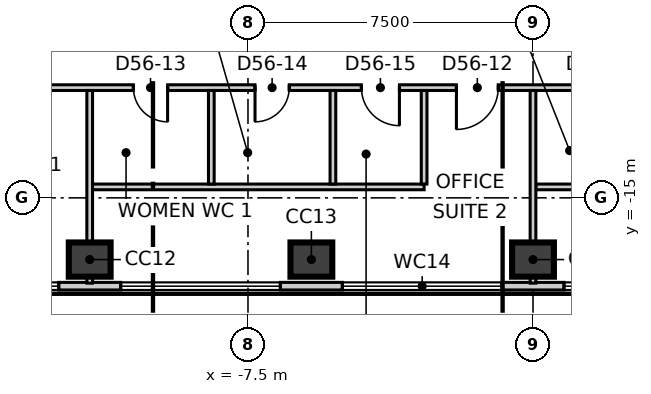
"""IFC4 building model, lengths in metres.
Left out: names, types, materials, properties, quantities, classifications, styles, units other than length and angle.
Written with IfcOpenShell. Run it as: python <this file> out.ifc"""

import sys

from ifc_helpers import new_model, si_unit, direction, frame, frame_2d, origin, origin_2d, place, context, subcontext, project, spatial, rectangle, extrude, element, fill, save


model = new_model("IFC4")
c1 = context("Model", 3, precision=1e-05, world=origin(), true_north=direction((0.0, 1.0)))
c2 = subcontext(c1, "Body", "Model", "MODEL_VIEW")
j1 = project(units=[si_unit("LENGTHUNIT", "METRE"), si_unit("PLANEANGLEUNIT", "RADIAN")], contexts=[c1])
p1 = place(None, origin())
s1 = spatial("IfcSite", under=j1, at=p1, CompositionType="ELEMENT")
p2 = place(p1, origin())
s2 = spatial("IfcBuilding", under=s1, at=p2, CompositionType="ELEMENT")
p3 = place(p2, frame((0.0, 0.0, 239.3)))
s3 = spatial("IfcBuildingStorey", under=s2, at=p3, CompositionType="ELEMENT", Elevation=239.3)
for number, where, z_axis, x_axis in (
    (1, (-11.665, -16.624, -0.3), (0.0, 0.0, 1.0), (1.0, 0.0, 0.0)),
    (2, (-5.832, -16.624, -0.3), (0.0, 0.0, 1.0), (1.0, 0.0, 0.0)),
    (3, (0.0, -16.624, -0.3), (0.0, 0.0, 1.0), (1.0, 0.0, 0.0)),
):
    element("IfcColumn", number, at=place(p3, frame(where, z_axis=z_axis, x_axis=x_axis)), inside=s3, PredefinedType="COLUMN", context=c2, shape_type="SweptSolid", body=[
        extrude(rectangle(XDim=1.1, YDim=0.9, at=origin_2d()), origin(), (0.0, 0.0, 1.0), 4.0),
    ])
p4 = place(p3, frame((-2.687, 29.995, 0.0), z_axis=(0.0, 0.0, 1.0), x_axis=(-0.499992950893, -0.86602947355, 0.0)))
e4 = element("IfcWall", 4, at=p4, inside=s3, PredefinedType="ELEMENTEDWALL", context=c2, shape_type="SweptSolid", body=[
    extrude(rectangle(XDim=49.247, YDim=0.2, at=frame_2d((24.624, 0.0))), origin(), (0.0, 0.0, 1.0), 3.7),
])
p5 = place(p4, frame((2.119, 0.0, 0.9)))
e5 = element("IfcOpeningElement", 5, at=p5, cuts=e4, PredefinedType="OPENING", context=c2, shape_type="SweptSolid", body=[
    extrude(rectangle(XDim=4.2, YDim=2.5, at=frame_2d((2.1, 1.25))), frame((0.0, 0.11, 0.0), z_axis=(0.0, -1.0, 0.0), x_axis=(1.0, 0.0, 0.0)), (0.0, 0.0, 1.0), 0.22),
])
p6 = place(p4, frame((7.951, 0.0, 0.9)))
e6 = element("IfcOpeningElement", 6, at=p6, cuts=e4, PredefinedType="OPENING", context=c2, shape_type="SweptSolid", body=[
    extrude(rectangle(XDim=4.2, YDim=2.5, at=frame_2d((2.1, 1.25))), frame((0.0, 0.11, 0.0), z_axis=(0.0, -1.0, 0.0), x_axis=(1.0, 0.0, 0.0)), (0.0, 0.0, 1.0), 0.22),
])
p7 = place(p4, frame((13.784, 0.0, 0.9)))
e7 = element("IfcOpeningElement", 7, at=p7, cuts=e4, PredefinedType="OPENING", context=c2, shape_type="SweptSolid", body=[
    extrude(rectangle(XDim=4.2, YDim=2.5, at=frame_2d((2.1, 1.25))), frame((0.0, 0.11, 0.0), z_axis=(0.0, -1.0, 0.0), x_axis=(1.0, 0.0, 0.0)), (0.0, 0.0, 1.0), 0.22),
])
p8 = place(p4, frame((19.617, 0.0, 0.9)))
e8 = element("IfcOpeningElement", 8, at=p8, cuts=e4, PredefinedType="OPENING", context=c2, shape_type="SweptSolid", body=[
    extrude(rectangle(XDim=4.2, YDim=2.5, at=frame_2d((2.1, 1.25))), frame((0.0, 0.11, 0.0), z_axis=(0.0, -1.0, 0.0), x_axis=(1.0, 0.0, 0.0)), (0.0, 0.0, 1.0), 0.22),
])
p9 = place(p4, frame((25.449, 0.0, 0.9)))
e9 = element("IfcOpeningElement", 9, at=p9, cuts=e4, PredefinedType="OPENING", context=c2, shape_type="SweptSolid", body=[
    extrude(rectangle(XDim=4.2, YDim=2.5, at=frame_2d((2.1, 1.25))), frame((0.0, 0.11, 0.0), z_axis=(0.0, -1.0, 0.0), x_axis=(1.0, 0.0, 0.0)), (0.0, 0.0, 1.0), 0.22),
])
p10 = place(p4, frame((31.282, 0.0, 0.9)))
e10 = element("IfcOpeningElement", 10, at=p10, cuts=e4, PredefinedType="OPENING", context=c2, shape_type="SweptSolid", body=[
    extrude(rectangle(XDim=4.2, YDim=2.5, at=frame_2d((2.1, 1.25))), frame((0.0, 0.11, 0.0), z_axis=(0.0, -1.0, 0.0), x_axis=(1.0, 0.0, 0.0)), (0.0, 0.0, 1.0), 0.22),
])
p11 = place(p4, frame((37.115, 0.0, 0.9)))
e11 = element("IfcOpeningElement", 11, at=p11, cuts=e4, PredefinedType="OPENING", context=c2, shape_type="SweptSolid", body=[
    extrude(rectangle(XDim=4.2, YDim=2.5, at=frame_2d((2.1, 1.25))), frame((0.0, 0.11, 0.0), z_axis=(0.0, -1.0, 0.0), x_axis=(1.0, 0.0, 0.0)), (0.0, 0.0, 1.0), 0.22),
])
p12 = place(p4, frame((42.947, 0.0, 0.9)))
e12 = element("IfcOpeningElement", 12, at=p12, cuts=e4, PredefinedType="OPENING", context=c2, shape_type="SweptSolid", body=[
    extrude(rectangle(XDim=4.2, YDim=2.5, at=frame_2d((2.1, 1.25))), frame((0.0, 0.11, 0.0), z_axis=(0.0, -1.0, 0.0), x_axis=(1.0, 0.0, 0.0)), (0.0, 0.0, 1.0), 0.22),
])
p13 = place(p3, frame((-24.633, -17.324, 0.0), z_axis=(0.0, 0.0, 1.0), x_axis=(1.0, 0.0, 0.0)))
e13 = element("IfcWall", 13, at=p13, inside=s3, PredefinedType="ELEMENTEDWALL", context=c2, shape_type="SweptSolid", body=[
    extrude(rectangle(XDim=49.246, YDim=0.2, at=frame_2d((24.623, 0.0))), origin(), (0.0, 0.0, 1.0), 3.7),
])
p14 = place(p13, frame((2.119, 0.0, 0.9)))
e14 = element("IfcOpeningElement", 14, at=p14, cuts=e13, PredefinedType="OPENING", context=c2, shape_type="SweptSolid", body=[
    extrude(rectangle(XDim=4.2, YDim=2.5, at=frame_2d((2.1, 1.25))), frame((0.0, 0.11, 0.0), z_axis=(0.0, -1.0, 0.0), x_axis=(1.0, 0.0, 0.0)), (0.0, 0.0, 1.0), 0.22),
])
p15 = place(p13, frame((7.952, 0.0, 0.9)))
e15 = element("IfcOpeningElement", 15, at=p15, cuts=e13, PredefinedType="OPENING", context=c2, shape_type="SweptSolid", body=[
    extrude(rectangle(XDim=4.2, YDim=2.5, at=frame_2d((2.1, 1.25))), frame((0.0, 0.11, 0.0), z_axis=(0.0, -1.0, 0.0), x_axis=(1.0, 0.0, 0.0)), (0.0, 0.0, 1.0), 0.22),
])
p16 = place(p13, frame((13.784, 0.0, 0.9)))
e16 = element("IfcOpeningElement", 16, at=p16, cuts=e13, PredefinedType="OPENING", context=c2, shape_type="SweptSolid", body=[
    extrude(rectangle(XDim=4.2, YDim=2.5, at=frame_2d((2.1, 1.25))), frame((0.0, 0.11, 0.0), z_axis=(0.0, -1.0, 0.0), x_axis=(1.0, 0.0, 0.0)), (0.0, 0.0, 1.0), 0.22),
])
p17 = place(p13, frame((19.617, 0.0, 0.9)))
e17 = element("IfcOpeningElement", 17, at=p17, cuts=e13, PredefinedType="OPENING", context=c2, shape_type="SweptSolid", body=[
    extrude(rectangle(XDim=4.2, YDim=2.5, at=frame_2d((2.1, 1.25))), frame((0.0, 0.11, 0.0), z_axis=(0.0, -1.0, 0.0), x_axis=(1.0, 0.0, 0.0)), (0.0, 0.0, 1.0), 0.22),
])
p18 = place(p13, frame((25.449, 0.0, 0.9)))
e18 = element("IfcOpeningElement", 18, at=p18, cuts=e13, PredefinedType="OPENING", context=c2, shape_type="SweptSolid", body=[
    extrude(rectangle(XDim=4.2, YDim=2.5, at=frame_2d((2.1, 1.25))), frame((0.0, 0.11, 0.0), z_axis=(0.0, -1.0, 0.0), x_axis=(1.0, 0.0, 0.0)), (0.0, 0.0, 1.0), 0.22),
])
p19 = place(p13, frame((31.282, 0.0, 0.9)))
e19 = element("IfcOpeningElement", 19, at=p19, cuts=e13, PredefinedType="OPENING", context=c2, shape_type="SweptSolid", body=[
    extrude(rectangle(XDim=4.2, YDim=2.5, at=frame_2d((2.1, 1.25))), frame((0.0, 0.11, 0.0), z_axis=(0.0, -1.0, 0.0), x_axis=(1.0, 0.0, 0.0)), (0.0, 0.0, 1.0), 0.22),
])
p20 = place(p13, frame((37.114, 0.0, 0.9)))
e20 = element("IfcOpeningElement", 20, at=p20, cuts=e13, PredefinedType="OPENING", context=c2, shape_type="SweptSolid", body=[
    extrude(rectangle(XDim=4.2, YDim=2.5, at=frame_2d((2.1, 1.25))), frame((0.0, 0.11, 0.0), z_axis=(0.0, -1.0, 0.0), x_axis=(1.0, 0.0, 0.0)), (0.0, 0.0, 1.0), 0.22),
])
p21 = place(p13, frame((42.947, 0.0, 0.9)))
e21 = element("IfcOpeningElement", 21, at=p21, cuts=e13, PredefinedType="OPENING", context=c2, shape_type="SweptSolid", body=[
    extrude(rectangle(XDim=4.2, YDim=2.5, at=frame_2d((2.1, 1.25))), frame((0.0, 0.11, 0.0), z_axis=(0.0, -1.0, 0.0), x_axis=(1.0, 0.0, 0.0)), (0.0, 0.0, 1.0), 0.22),
])
p22 = place(p3, frame((-20.807, -12.1, 0.0), z_axis=(0.0, 0.0, 1.0), x_axis=(1.0, 0.0, 0.0)))
e22 = element("IfcWall", 22, at=p22, inside=s3, PredefinedType="PARTITIONING", context=c2, shape_type="SweptSolid", body=[
    extrude(rectangle(XDim=41.764, YDim=0.15, at=frame_2d((20.882, 0.0))), origin(), (0.0, 0.0, 1.0), 3.7),
])
p23 = place(p22, frame((3.9, 0.0, 0.0)))
e23 = element("IfcOpeningElement", 23, at=p23, cuts=e22, PredefinedType="OPENING", context=c2, shape_type="SweptSolid", body=[
    extrude(rectangle(XDim=1.1, YDim=2.1, at=frame_2d((0.55, 1.05))), frame((0.0, 0.085, 0.0), z_axis=(0.0, -1.0, 0.0), x_axis=(1.0, 0.0, 0.0)), (0.0, 0.0, 1.0), 0.17),
])
p24 = place(p22, frame((18.792, 0.0, 0.0)))
e24 = element("IfcOpeningElement", 24, at=p24, cuts=e22, PredefinedType="OPENING", context=c2, shape_type="SweptSolid", body=[
    extrude(rectangle(XDim=1.1, YDim=2.1, at=frame_2d((0.55, 1.05))), frame((0.0, 0.085, 0.0), z_axis=(0.0, -1.0, 0.0), x_axis=(1.0, 0.0, 0.0)), (0.0, 0.0, 1.0), 0.17),
])
p25 = place(p22, frame((10.292, 0.0, 0.0)))
e25 = element("IfcOpeningElement", 25, at=p25, cuts=e22, PredefinedType="OPENING", context=c2, shape_type="SweptSolid", body=[
    extrude(rectangle(XDim=0.9, YDim=2.1, at=frame_2d((0.45, 1.05))), frame((0.0, 0.085, 0.0), z_axis=(0.0, -1.0, 0.0), x_axis=(1.0, 0.0, 0.0)), (0.0, 0.0, 1.0), 0.17),
])
p26 = place(p22, frame((13.492, 0.0, 0.0)))
e26 = element("IfcOpeningElement", 26, at=p26, cuts=e22, PredefinedType="OPENING", context=c2, shape_type="SweptSolid", body=[
    extrude(rectangle(XDim=0.9, YDim=2.1, at=frame_2d((0.45, 1.05))), frame((0.0, 0.085, 0.0), z_axis=(0.0, -1.0, 0.0), x_axis=(1.0, 0.0, 0.0)), (0.0, 0.0, 1.0), 0.17),
])
p27 = place(p22, frame((16.292, 0.0, 0.0)))
e27 = element("IfcOpeningElement", 27, at=p27, cuts=e22, PredefinedType="OPENING", context=c2, shape_type="SweptSolid", body=[
    extrude(rectangle(XDim=1.0, YDim=2.1, at=frame_2d((0.5, 1.05))), frame((0.0, 0.085, 0.0), z_axis=(0.0, -1.0, 0.0), x_axis=(1.0, 0.0, 0.0)), (0.0, 0.0, 1.0), 0.17),
])
p28 = place(p22, frame((29.057, 0.0, 0.0)))
e28 = element("IfcOpeningElement", 28, at=p28, cuts=e22, PredefinedType="OPENING", context=c2, shape_type="SweptSolid", body=[
    extrude(rectangle(XDim=1.1, YDim=2.1, at=frame_2d((0.55, 1.05))), frame((0.0, 0.085, 0.0), z_axis=(0.0, -1.0, 0.0), x_axis=(1.0, 0.0, 0.0)), (0.0, 0.0, 1.0), 0.17),
])
p29 = place(p22, frame((22.157, 0.0, 0.0)))
e29 = element("IfcOpeningElement", 29, at=p29, cuts=e22, PredefinedType="OPENING", context=c2, shape_type="SweptSolid", body=[
    extrude(rectangle(XDim=0.9, YDim=2.1, at=frame_2d((0.45, 1.05))), frame((0.0, 0.085, 0.0), z_axis=(0.0, -1.0, 0.0), x_axis=(1.0, 0.0, 0.0)), (0.0, 0.0, 1.0), 0.17),
])
p30 = place(p22, frame((25.157, 0.0, 0.0)))
e30 = element("IfcOpeningElement", 30, at=p30, cuts=e22, PredefinedType="OPENING", context=c2, shape_type="SweptSolid", body=[
    extrude(rectangle(XDim=0.9, YDim=2.1, at=frame_2d((0.45, 1.05))), frame((0.0, 0.085, 0.0), z_axis=(0.0, -1.0, 0.0), x_axis=(1.0, 0.0, 0.0)), (0.0, 0.0, 1.0), 0.17),
])
p31 = place(p22, frame((36.522, 0.0, 0.0)))
e31 = element("IfcOpeningElement", 31, at=p31, cuts=e22, PredefinedType="OPENING", context=c2, shape_type="SweptSolid", body=[
    extrude(rectangle(XDim=1.1, YDim=2.1, at=frame_2d((0.55, 1.05))), frame((0.0, 0.085, 0.0), z_axis=(0.0, -1.0, 0.0), x_axis=(1.0, 0.0, 0.0)), (0.0, 0.0, 1.0), 0.17),
])
p32 = place(p3, frame((-20.883, -11.97, 0.0), z_axis=(0.0, 0.0, 1.0), x_axis=(0.500006150555, 0.866021852731, 0.0)))
e32 = element("IfcWall", 32, at=p32, inside=s3, PredefinedType="PARTITIONING", context=c2, shape_type="SweptSolid", body=[
    extrude(rectangle(XDim=41.766, YDim=0.15, at=frame_2d((20.883, 0.0))), origin(), (0.0, 0.0, 1.0), 3.7),
])
p33 = place(p32, frame((36.616, 0.0, 0.0)))
e33 = element("IfcOpeningElement", 33, at=p33, cuts=e32, PredefinedType="OPENING", context=c2, shape_type="SweptSolid", body=[
    extrude(rectangle(XDim=1.1, YDim=2.1, at=frame_2d((0.55, 1.05))), frame((0.0, 0.085, 0.0), z_axis=(0.0, -1.0, 0.0), x_axis=(1.0, 0.0, 0.0)), (0.0, 0.0, 1.0), 0.17),
])
p34 = place(p32, frame((21.723, 0.0, 0.0)))
e34 = element("IfcOpeningElement", 34, at=p34, cuts=e32, PredefinedType="OPENING", context=c2, shape_type="SweptSolid", body=[
    extrude(rectangle(XDim=1.1, YDim=2.1, at=frame_2d((0.55, 1.05))), frame((0.0, 0.085, 0.0), z_axis=(0.0, -1.0, 0.0), x_axis=(1.0, 0.0, 0.0)), (0.0, 0.0, 1.0), 0.17),
])
p35 = place(p32, frame((30.423, 0.0, 0.0)))
e35 = element("IfcOpeningElement", 35, at=p35, cuts=e32, PredefinedType="OPENING", context=c2, shape_type="SweptSolid", body=[
    extrude(rectangle(XDim=0.9, YDim=2.1, at=frame_2d((0.45, 1.05))), frame((0.0, 0.085, 0.0), z_axis=(0.0, -1.0, 0.0), x_axis=(1.0, 0.0, 0.0)), (0.0, 0.0, 1.0), 0.17),
])
p36 = place(p32, frame((27.223, 0.0, 0.0)))
e36 = element("IfcOpeningElement", 36, at=p36, cuts=e32, PredefinedType="OPENING", context=c2, shape_type="SweptSolid", body=[
    extrude(rectangle(XDim=0.9, YDim=2.1, at=frame_2d((0.45, 1.05))), frame((0.0, 0.085, 0.0), z_axis=(0.0, -1.0, 0.0), x_axis=(1.0, 0.0, 0.0)), (0.0, 0.0, 1.0), 0.17),
])
p37 = place(p32, frame((24.323, 0.0, 0.0)))
e37 = element("IfcOpeningElement", 37, at=p37, cuts=e32, PredefinedType="OPENING", context=c2, shape_type="SweptSolid", body=[
    extrude(rectangle(XDim=1.0, YDim=2.1, at=frame_2d((0.5, 1.05))), frame((0.0, 0.085, 0.0), z_axis=(0.0, -1.0, 0.0), x_axis=(1.0, 0.0, 0.0)), (0.0, 0.0, 1.0), 0.17),
])
p38 = place(p32, frame((17.358, 0.0, 0.0)))
e38 = element("IfcOpeningElement", 38, at=p38, cuts=e32, PredefinedType="OPENING", context=c2, shape_type="SweptSolid", body=[
    extrude(rectangle(XDim=1.0, YDim=2.1, at=frame_2d((0.5, 1.05))), frame((0.0, 0.085, 0.0), z_axis=(0.0, -1.0, 0.0), x_axis=(1.0, 0.0, 0.0)), (0.0, 0.0, 1.0), 0.17),
])
p39 = place(p32, frame((6.825, 0.0, 0.0)))
e39 = element("IfcOpeningElement", 39, at=p39, cuts=e32, PredefinedType="OPENING", context=c2, shape_type="SweptSolid", body=[
    extrude(rectangle(XDim=1.1, YDim=2.1, at=frame_2d((0.55, 1.05))), frame((0.0, 0.085, 0.0), z_axis=(0.0, -1.0, 0.0), x_axis=(1.0, 0.0, 0.0)), (0.0, 0.0, 1.0), 0.17),
])
p40 = place(p3, frame((-11.665, -17.244, 0.0), z_axis=(0.0, 0.0, 1.0), x_axis=(0.0, 1.0, 0.0)))
e40 = element("IfcWall", 40, at=p40, inside=s3, PredefinedType="PARTITIONING", context=c2, shape_type="SweptSolid", body=[
    extrude(rectangle(XDim=5.069, YDim=0.15, at=frame_2d((2.534, 0.0))), origin(), (0.0, 0.0, 1.0), 3.7),
])
p41 = place(p3, frame((-11.59, -14.712, 0.0), z_axis=(0.0, 0.0, 1.0), x_axis=(1.0, 0.0, 0.0)))
e41 = element("IfcWall", 41, at=p41, inside=s3, PredefinedType="PARTITIONING", context=c2, shape_type="SweptSolid", body=[
    extrude(rectangle(XDim=8.725, YDim=0.15, at=frame_2d((4.363, 0.0))), origin(), (0.0, 0.0, 1.0), 3.7),
])
p42 = place(p3, frame((0.075, -14.712, 0.0), z_axis=(0.0, 0.0, 1.0), x_axis=(1.0, 0.0, 0.0)))
e42 = element("IfcWall", 42, at=p42, inside=s3, PredefinedType="PARTITIONING", context=c2, shape_type="SweptSolid", body=[
    extrude(rectangle(XDim=5.925, YDim=0.15, at=frame_2d((2.962, 0.0))), origin(), (0.0, 0.0, 1.0), 3.7),
])
for number, where, z_axis, x_axis in (
    (43, (-8.465, -14.637, 0.0), (0.0, 0.0, 1.0), (0.0, 1.0, 0.0)),
    (44, (-2.865, -14.637, 0.0), (0.0, 0.0, 1.0), (0.0, 1.0, 0.0)),
    (45, (-5.265, -14.637, 0.0), (0.0, 0.0, 1.0), (0.0, 1.0, 0.0)),
):
    element("IfcWall", number, at=place(p3, frame(where, z_axis=z_axis, x_axis=x_axis)), inside=s3, PredefinedType="PARTITIONING", context=c2, shape_type="SweptSolid", body=[
        extrude(rectangle(XDim=2.462, YDim=0.15, at=frame_2d((1.231, 0.0))), origin(), (0.0, 0.0, 1.0), 3.7),
    ])
p43 = place(p3, frame((0.0, -17.244, 0.0), z_axis=(0.0, 0.0, 1.0), x_axis=(0.0, 1.0, 0.0)))
e46 = element("IfcWall", 46, at=p43, inside=s3, PredefinedType="PARTITIONING", context=c2, shape_type="SweptSolid", body=[
    extrude(rectangle(XDim=5.069, YDim=0.15, at=frame_2d((2.534, 0.0))), origin(), (0.0, 0.0, 1.0), 3.2),
])
p44 = place(p3, frame((0.075, 24.07, 0.0), z_axis=(0.0, 0.0, 1.0), x_axis=(0.500006834213, -0.866021458014, 0.0)))
e47 = element("IfcWall", 47, at=p44, inside=s3, PredefinedType="PARTITIONING", context=c2, shape_type="SweptSolid", body=[
    extrude(rectangle(XDim=41.616, YDim=0.15, at=frame_2d((20.808, 0.0))), origin(), (0.0, 0.0, 1.0), 3.7),
])
p45 = place(p44, frame((36.616, 0.0, 0.0)))
e48 = element("IfcOpeningElement", 48, at=p45, cuts=e47, PredefinedType="OPENING", context=c2, shape_type="SweptSolid", body=[
    extrude(rectangle(XDim=1.1, YDim=2.1, at=frame_2d((0.55, 1.05))), frame((0.0, 0.085, 0.0), z_axis=(0.0, -1.0, 0.0), x_axis=(1.0, 0.0, 0.0)), (0.0, 0.0, 1.0), 0.17),
])
p46 = place(p44, frame((29.024, 0.0, 0.0)))
e49 = element("IfcOpeningElement", 49, at=p46, cuts=e47, PredefinedType="OPENING", context=c2, shape_type="SweptSolid", body=[
    extrude(rectangle(XDim=1.0, YDim=2.1, at=frame_2d((0.5, 1.05))), frame((0.0, 0.085, 0.0), z_axis=(0.0, -1.0, 0.0), x_axis=(1.0, 0.0, 0.0)), (0.0, 0.0, 1.0), 0.17),
])
p47 = place(p44, frame((23.19, 0.0, 0.0)))
e50 = element("IfcOpeningElement", 50, at=p47, cuts=e47, PredefinedType="OPENING", context=c2, shape_type="SweptSolid", body=[
    extrude(rectangle(XDim=1.0, YDim=2.1, at=frame_2d((0.5, 1.05))), frame((0.0, 0.085, 0.0), z_axis=(0.0, -1.0, 0.0), x_axis=(1.0, 0.0, 0.0)), (0.0, 0.0, 1.0), 0.17),
])
p48 = place(p44, frame((14.458, 0.0, 0.0)))
e51 = element("IfcOpeningElement", 51, at=p48, cuts=e47, PredefinedType="OPENING", context=c2, shape_type="SweptSolid", body=[
    extrude(rectangle(XDim=1.1, YDim=2.1, at=frame_2d((0.55, 1.05))), frame((0.0, 0.085, 0.0), z_axis=(0.0, -1.0, 0.0), x_axis=(1.0, 0.0, 0.0)), (0.0, 0.0, 1.0), 0.17),
])
p49 = place(p44, frame((3.993, 0.0, 0.0)))
e52 = element("IfcOpeningElement", 52, at=p49, cuts=e47, PredefinedType="OPENING", context=c2, shape_type="SweptSolid", body=[
    extrude(rectangle(XDim=1.1, YDim=2.1, at=frame_2d((0.55, 1.05))), frame((0.0, 0.085, 0.0), z_axis=(0.0, -1.0, 0.0), x_axis=(1.0, 0.0, 0.0)), (0.0, 0.0, 1.0), 0.17),
])
p50 = place(p15, origin())
e53 = element("IfcWindow", 53, at=p50, inside=s3, PartitioningType="SINGLE_PANEL", PredefinedType="WINDOW", context=c2, shape_type="SweptSolid", body=[
    extrude(rectangle(XDim=4.2, YDim=2.5, at=frame_2d((2.1, 1.25))), frame((0.0, 0.03, 0.0), z_axis=(0.0, -1.0, 0.0), x_axis=(1.0, 0.0, 0.0)), (0.0, 0.0, 1.0), 0.06),
])
fill(e15, e53)
p51 = place(p16, origin())
e54 = element("IfcWindow", 54, at=p51, inside=s3, PartitioningType="SINGLE_PANEL", PredefinedType="WINDOW", context=c2, shape_type="SweptSolid", body=[
    extrude(rectangle(XDim=4.2, YDim=2.5, at=frame_2d((2.1, 1.25))), frame((0.0, 0.03, 0.0), z_axis=(0.0, -1.0, 0.0), x_axis=(1.0, 0.0, 0.0)), (0.0, 0.0, 1.0), 0.06),
])
fill(e16, e54)
p52 = place(p17, origin())
e55 = element("IfcWindow", 55, at=p52, inside=s3, PartitioningType="SINGLE_PANEL", PredefinedType="WINDOW", context=c2, shape_type="SweptSolid", body=[
    extrude(rectangle(XDim=4.2, YDim=2.5, at=frame_2d((2.1, 1.25))), frame((0.0, 0.03, 0.0), z_axis=(0.0, -1.0, 0.0), x_axis=(1.0, 0.0, 0.0)), (0.0, 0.0, 1.0), 0.06),
])
fill(e17, e55)
p53 = place(p18, origin())
e56 = element("IfcWindow", 56, at=p53, inside=s3, PartitioningType="SINGLE_PANEL", PredefinedType="WINDOW", context=c2, shape_type="SweptSolid", body=[
    extrude(rectangle(XDim=4.2, YDim=2.5, at=frame_2d((2.1, 1.25))), frame((0.0, 0.03, 0.0), z_axis=(0.0, -1.0, 0.0), x_axis=(1.0, 0.0, 0.0)), (0.0, 0.0, 1.0), 0.06),
])
fill(e18, e56)
p54 = place(p24, origin())
e57 = element("IfcDoor", 57, at=p54, inside=s3, OperationType="SINGLE_SWING_LEFT", PredefinedType="DOOR", context=c2, shape_type="SweptSolid", body=[
    extrude(rectangle(XDim=1.1, YDim=2.1, at=frame_2d((0.55, 1.05))), frame((0.0, 0.025, 0.0), z_axis=(0.0, -1.0, 0.0), x_axis=(1.0, 0.0, 0.0)), (0.0, 0.0, 1.0), 0.05),
])
fill(e24, e57)
p55 = place(p25, origin())
e58 = element("IfcDoor", 58, at=p55, inside=s3, OperationType="SINGLE_SWING_RIGHT", PredefinedType="DOOR", context=c2, shape_type="SweptSolid", body=[
    extrude(rectangle(XDim=0.9, YDim=2.1, at=frame_2d((0.45, 1.05))), frame((0.0, 0.025, 0.0), z_axis=(0.0, -1.0, 0.0), x_axis=(1.0, 0.0, 0.0)), (0.0, 0.0, 1.0), 0.05),
])
fill(e25, e58)
p56 = place(p26, origin())
e59 = element("IfcDoor", 59, at=p56, inside=s3, OperationType="SINGLE_SWING_LEFT", PredefinedType="DOOR", context=c2, shape_type="SweptSolid", body=[
    extrude(rectangle(XDim=0.9, YDim=2.1, at=frame_2d((0.45, 1.05))), frame((0.0, 0.025, 0.0), z_axis=(0.0, -1.0, 0.0), x_axis=(1.0, 0.0, 0.0)), (0.0, 0.0, 1.0), 0.05),
])
fill(e26, e59)
p57 = place(p27, origin())
e60 = element("IfcDoor", 60, at=p57, inside=s3, OperationType="SINGLE_SWING_RIGHT", PredefinedType="DOOR", context=c2, shape_type="SweptSolid", body=[
    extrude(rectangle(XDim=1.0, YDim=2.1, at=frame_2d((0.5, 1.05))), frame((0.0, 0.025, 0.0), z_axis=(0.0, -1.0, 0.0), x_axis=(1.0, 0.0, 0.0)), (0.0, 0.0, 1.0), 0.05),
])
fill(e27, e60)
save(model, sys.argv[1])
